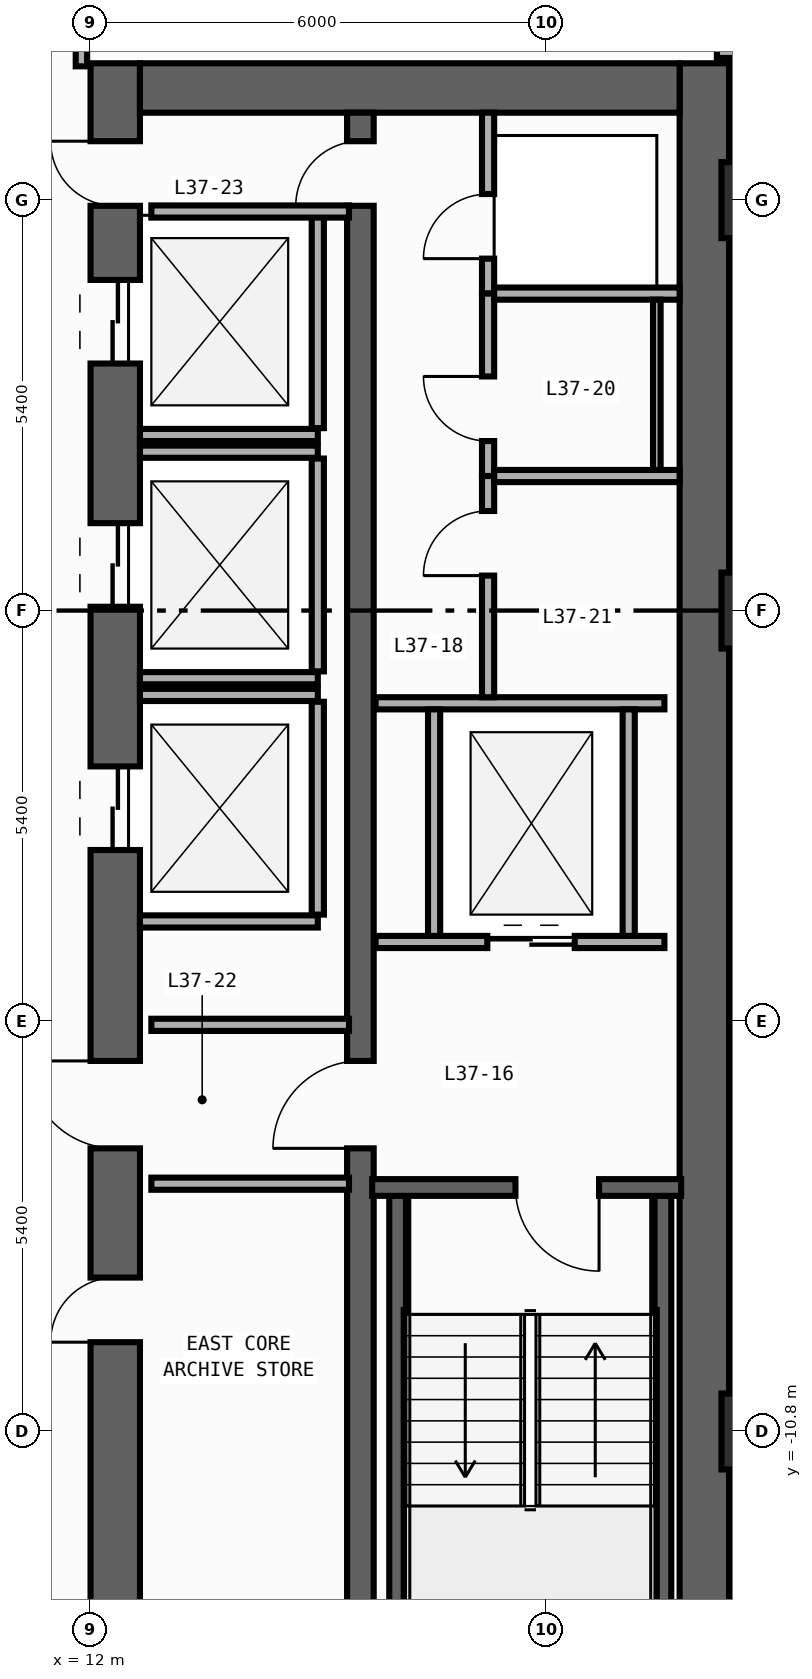
"""IFC4 building model, lengths in metres.
Left out: names, types, materials, properties, quantities, classifications, styles, units other than length and angle.
Written with IfcOpenShell. Run it as: python <this file> out.ifc"""

import sys

from ifc_helpers import new_model, si_unit, direction, frame, frame_2d, origin, origin_2d, place, context, subcontext, project, spatial, rectangle, extrude, element, fill, save


model = new_model("IFC4")
c1 = context("Model", 3, precision=1e-05, world=origin(), true_north=direction((0.0, 1.0)))
c2 = subcontext(c1, "Body", "Model", "MODEL_VIEW")
j1 = project(units=[si_unit("LENGTHUNIT", "METRE"), si_unit("PLANEANGLEUNIT", "RADIAN")], contexts=[c1])
p1 = place(None, origin())
s1 = spatial("IfcSite", under=j1, at=p1, CompositionType="ELEMENT")
p2 = place(p1, origin())
s2 = spatial("IfcBuilding", under=s1, at=p2, CompositionType="ELEMENT")
p3 = place(p2, frame((0.0, 0.0, 165.0)))
s3 = spatial("IfcBuildingStorey", under=s2, at=p3, CompositionType="ELEMENT", Elevation=165.0)
p4 = place(p3, frame((12.325, -19.8, 0.0), z_axis=(0.0, 0.0, 1.0), x_axis=(0.0, 1.0, 0.0)))
e1 = element("IfcWall", 1, at=p4, inside=s3, PredefinedType="SHEAR", context=c2, shape_type="SweptSolid", body=[
    extrude(rectangle(XDim=27.0, YDim=0.65, at=frame_2d((13.5, 0.0))), origin(), (0.0, 0.0, 1.0), 3.54),
])
p5 = place(p4, frame((23.05, 0.0, 0.0)))
e2 = element("IfcOpeningElement", 2, at=p5, cuts=e1, PredefinedType="OPENING", context=c2, shape_type="SweptSolid", body=[
    extrude(rectangle(XDim=1.1, YDim=2.2, at=frame_2d((0.55, 1.1))), frame((0.0, 0.335, 0.0), z_axis=(0.0, -1.0, 0.0), x_axis=(1.0, 0.0, 0.0)), (0.0, 0.0, 1.0), 0.67),
])
p6 = place(p4, frame((19.85, 0.0, 0.0)))
e3 = element("IfcOpeningElement", 3, at=p6, cuts=e1, PredefinedType="OPENING", context=c2, shape_type="SweptSolid", body=[
    extrude(rectangle(XDim=1.1, YDim=2.2, at=frame_2d((0.55, 1.1))), frame((0.0, 0.335, 0.0), z_axis=(0.0, -1.0, 0.0), x_axis=(1.0, 0.0, 0.0)), (0.0, 0.0, 1.0), 0.67),
])
p7 = place(p4, frame((16.65, 0.0, 0.0)))
e4 = element("IfcOpeningElement", 4, at=p7, cuts=e1, PredefinedType="OPENING", context=c2, shape_type="SweptSolid", body=[
    extrude(rectangle(XDim=1.1, YDim=2.2, at=frame_2d((0.55, 1.1))), frame((0.0, 0.335, 0.0), z_axis=(0.0, -1.0, 0.0), x_axis=(1.0, 0.0, 0.0)), (0.0, 0.0, 1.0), 0.67),
])
p8 = place(p4, frame((10.175, 0.0, 0.0)))
e5 = element("IfcOpeningElement", 5, at=p8, cuts=e1, PredefinedType="OPENING", context=c2, shape_type="SweptSolid", body=[
    extrude(rectangle(XDim=0.85, YDim=2.1, at=frame_2d((0.425, 1.05))), frame((0.0, 0.335, 0.0), z_axis=(0.0, -1.0, 0.0), x_axis=(1.0, 0.0, 0.0)), (0.0, 0.0, 1.0), 0.67),
])
p9 = place(p4, frame((12.725, 0.0, 0.0)))
e6 = element("IfcOpeningElement", 6, at=p9, cuts=e1, PredefinedType="OPENING", context=c2, shape_type="SweptSolid", body=[
    extrude(rectangle(XDim=1.15, YDim=2.2, at=frame_2d((0.575, 1.1))), frame((0.0, 0.335, 0.0), z_axis=(0.0, -1.0, 0.0), x_axis=(1.0, 0.0, 0.0)), (0.0, 0.0, 1.0), 0.67),
])
p10 = place(p4, frame((25.125, 0.0, 0.0)))
e7 = element("IfcOpeningElement", 7, at=p10, cuts=e1, PredefinedType="OPENING", context=c2, shape_type="SweptSolid", body=[
    extrude(rectangle(XDim=0.85, YDim=2.1, at=frame_2d((0.425, 1.05))), frame((0.0, 0.335, 0.0), z_axis=(0.0, -1.0, 0.0), x_axis=(1.0, 0.0, 0.0)), (0.0, 0.0, 1.0), 0.67),
])
p11 = place(p3, frame((20.075, -19.8, 0.0), z_axis=(0.0, 0.0, 1.0), x_axis=(0.0, 1.0, 0.0)))
e8 = element("IfcWall", 8, at=p11, inside=s3, PredefinedType="SHEAR", context=c2, shape_type="SweptSolid", body=[
    extrude(rectangle(XDim=27.0, YDim=0.65, at=frame_2d((13.5, 0.0))), origin(), (0.0, 0.0, 1.0), 3.54),
])
p12 = place(p3, frame((12.65, 6.875, 0.0), z_axis=(0.0, 0.0, 1.0), x_axis=(1.0, 0.0, 0.0)))
e9 = element("IfcWall", 9, at=p12, inside=s3, PredefinedType="SHEAR", context=c2, shape_type="SweptSolid", body=[
    extrude(rectangle(XDim=7.1, YDim=0.65, at=frame_2d((3.55, 0.0))), origin(), (0.0, 0.0, 1.0), 3.54),
])
p13 = place(p3, frame((15.55, -19.15, 0.0), z_axis=(0.0, 0.0, 1.0), x_axis=(0.0, 1.0, 0.0)))
e10 = element("IfcWall", 10, at=p13, inside=s3, PredefinedType="SHEAR", context=c2, shape_type="SweptSolid", body=[
    extrude(rectangle(XDim=25.7, YDim=0.35, at=frame_2d((12.85, 0.0))), origin(), (0.0, 0.0, 1.0), 3.54),
])
p14 = place(p13, frame((12.075, 0.0, 0.0)))
e11 = element("IfcOpeningElement", 11, at=p14, cuts=e10, PredefinedType="OPENING", context=c2, shape_type="SweptSolid", body=[
    extrude(rectangle(XDim=1.15, YDim=2.2, at=frame_2d((0.575, 1.1))), frame((0.0, 0.185, 0.0), z_axis=(0.0, -1.0, 0.0), x_axis=(1.0, 0.0, 0.0)), (0.0, 0.0, 1.0), 0.37),
])
p15 = place(p13, frame((24.475, 0.0, 0.0)))
e12 = element("IfcOpeningElement", 12, at=p15, cuts=e10, PredefinedType="OPENING", context=c2, shape_type="SweptSolid", body=[
    extrude(rectangle(XDim=0.85, YDim=2.1, at=frame_2d((0.425, 1.05))), frame((0.0, 0.185, 0.0), z_axis=(0.0, -1.0, 0.0), x_axis=(1.0, 0.0, 0.0)), (0.0, 0.0, 1.0), 0.37),
])
for number, where, z_axis, x_axis in (
    (13, (16.04, -19.01, 0.0), (0.0, 0.0, 1.0), (0.0, 1.0, 0.0)),
    (14, (19.53, -19.01, 0.0), (0.0, 0.0, 1.0), (0.0, 1.0, 0.0)),
):
    element("IfcWall", number, at=place(p3, frame(where, z_axis=z_axis, x_axis=x_axis)), inside=s3, PredefinedType="SHEAR", context=c2, shape_type="SweptSolid", body=[
        extrude(rectangle(XDim=11.42, YDim=0.22, at=frame_2d((5.71, 0.0))), origin(), (0.0, 0.0, 1.0), 3.54),
    ])
p16 = place(p3, frame((19.77, -7.59, 0.0), z_axis=(0.0, 0.0, 1.0), x_axis=(-1.0, 0.0, 0.0)))
e15 = element("IfcWall", 15, at=p16, inside=s3, PredefinedType="SHEAR", context=c2, shape_type="SweptSolid", body=[
    extrude(rectangle(XDim=4.065, YDim=0.22, at=frame_2d((2.032, 0.0))), origin(), (0.0, 0.0, 1.0), 3.54),
])
p17 = place(p16, frame((1.08, 0.0, 0.0)))
e16 = element("IfcOpeningElement", 16, at=p17, cuts=e15, PredefinedType="OPENING", context=c2, shape_type="SweptSolid", body=[
    extrude(rectangle(XDim=1.1, YDim=2.2, at=frame_2d((0.55, 1.1))), frame((0.0, 0.12, 0.0), z_axis=(0.0, -1.0, 0.0), x_axis=(1.0, 0.0, 0.0)), (0.0, 0.0, 1.0), 0.24),
])
for number, where, z_axis, x_axis in (
    (17, (20.8, -10.8, 0.0), (0.0, 0.0, 1.0), (1.0, 0.0, 0.0)),
    (18, (20.8, 0.0, 0.0), (0.0, 0.0, 1.0), (1.0, 0.0, 0.0)),
    (19, (20.8, 5.4, 0.0), (0.0, 0.0, 1.0), (1.0, 0.0, 0.0)),
):
    element("IfcColumn", number, at=place(p3, frame(where, z_axis=z_axis, x_axis=x_axis)), inside=s3, PredefinedType="COLUMN", context=c2, shape_type="SweptSolid", body=[
        extrude(rectangle(XDim=1.0, YDim=1.0, at=origin_2d()), origin(), (0.0, 0.0, 1.0), 3.8),
    ])
p18 = place(p3, frame((12.65, 2.31, 0.0), z_axis=(0.0, 0.0, 1.0), x_axis=(1.0, 0.0, 0.0)))
e20 = element("IfcWall", 20, at=p18, inside=s3, PredefinedType="STANDARD", context=c2, shape_type="SweptSolid", body=[
    extrude(rectangle(XDim=2.34, YDim=0.16, at=frame_2d((1.17, 0.0))), origin(), (0.0, 0.0, 1.0), 3.54),
])
p19 = place(p3, frame((14.99, 2.4, 0.0), z_axis=(0.0, 0.0, 1.0), x_axis=(0.0, 1.0, 0.0)))
e21 = element("IfcWall", 21, at=p19, inside=s3, PredefinedType="STANDARD", context=c2, shape_type="SweptSolid", body=[
    extrude(rectangle(XDim=2.8, YDim=0.16, at=frame_2d((1.4, 0.0))), origin(), (0.0, 0.0, 1.0), 3.54),
])
for number, where, z_axis, x_axis in (
    (22, (12.65, -0.89, 0.0), (0.0, 0.0, 1.0), (1.0, 0.0, 0.0)),
    (23, (12.65, 2.09, 0.0), (0.0, 0.0, 1.0), (1.0, 0.0, 0.0)),
):
    element("IfcWall", number, at=place(p3, frame(where, z_axis=z_axis, x_axis=x_axis)), inside=s3, PredefinedType="STANDARD", context=c2, shape_type="SweptSolid", body=[
        extrude(rectangle(XDim=2.34, YDim=0.16, at=frame_2d((1.17, 0.0))), origin(), (0.0, 0.0, 1.0), 3.54),
    ])
p20 = place(p3, frame((14.99, -0.8, 0.0), z_axis=(0.0, 0.0, 1.0), x_axis=(0.0, 1.0, 0.0)))
e24 = element("IfcWall", 24, at=p20, inside=s3, PredefinedType="STANDARD", context=c2, shape_type="SweptSolid", body=[
    extrude(rectangle(XDim=2.8, YDim=0.16, at=frame_2d((1.4, 0.0))), origin(), (0.0, 0.0, 1.0), 3.54),
])
for number, where, z_axis, x_axis in (
    (25, (12.65, -4.09, 0.0), (0.0, 0.0, 1.0), (1.0, 0.0, 0.0)),
    (26, (12.65, -1.11, 0.0), (0.0, 0.0, 1.0), (1.0, 0.0, 0.0)),
):
    element("IfcWall", number, at=place(p3, frame(where, z_axis=z_axis, x_axis=x_axis)), inside=s3, PredefinedType="STANDARD", context=c2, shape_type="SweptSolid", body=[
        extrude(rectangle(XDim=2.34, YDim=0.16, at=frame_2d((1.17, 0.0))), origin(), (0.0, 0.0, 1.0), 3.54),
    ])
p21 = place(p3, frame((14.99, -4.0, 0.0), z_axis=(0.0, 0.0, 1.0), x_axis=(0.0, 1.0, 0.0)))
e27 = element("IfcWall", 27, at=p21, inside=s3, PredefinedType="STANDARD", context=c2, shape_type="SweptSolid", body=[
    extrude(rectangle(XDim=2.8, YDim=0.16, at=frame_2d((1.4, 0.0))), origin(), (0.0, 0.0, 1.0), 3.54),
])
p22 = place(p3, frame((15.75, -4.36, 0.0), z_axis=(0.0, 0.0, 1.0), x_axis=(1.0, 0.0, 0.0)))
e28 = element("IfcWall", 28, at=p22, inside=s3, PredefinedType="STANDARD", context=c2, shape_type="SweptSolid", body=[
    extrude(rectangle(XDim=3.8, YDim=0.16, at=frame_2d((1.9, 0.0))), origin(), (0.0, 0.0, 1.0), 3.54),
])
p23 = place(p22, frame((1.47, 0.0, 0.0)))
e29 = element("IfcOpeningElement", 29, at=p23, cuts=e28, PredefinedType="OPENING", context=c2, shape_type="SweptSolid", body=[
    extrude(rectangle(XDim=1.15, YDim=2.2, at=frame_2d((0.575, 1.1))), frame((0.0, 0.09, 0.0), z_axis=(0.0, -1.0, 0.0), x_axis=(1.0, 0.0, 0.0)), (0.0, 0.0, 1.0), 0.18),
])
p24 = place(p3, frame((15.75, -1.22, 0.0), z_axis=(0.0, 0.0, 1.0), x_axis=(1.0, 0.0, 0.0)))
e30 = element("IfcWall", 30, at=p24, inside=s3, PredefinedType="STANDARD", context=c2, shape_type="SweptSolid", body=[
    extrude(rectangle(XDim=3.8, YDim=0.16, at=frame_2d((1.9, 0.0))), origin(), (0.0, 0.0, 1.0), 3.54),
])
for number, where, z_axis, x_axis in (
    (31, (16.52, -4.28, 0.0), (0.0, 0.0, 1.0), (0.0, 1.0, 0.0)),
    (32, (19.08, -4.28, 0.0), (0.0, 0.0, 1.0), (0.0, 1.0, 0.0)),
):
    element("IfcWall", number, at=place(p3, frame(where, z_axis=z_axis, x_axis=x_axis)), inside=s3, PredefinedType="STANDARD", context=c2, shape_type="SweptSolid", body=[
        extrude(rectangle(XDim=2.98, YDim=0.16, at=frame_2d((1.49, 0.0))), origin(), (0.0, 0.0, 1.0), 3.54),
    ])
for number, where, z_axis, x_axis in (
    (33, (12.8, -5.45, 0.0), (0.0, 0.0, 1.0), (1.0, 0.0, 0.0)),
    (34, (12.8, -7.54, 0.0), (0.0, 0.0, 1.0), (1.0, 0.0, 0.0)),
    (35, (12.8, 5.25, 0.0), (0.0, 0.0, 1.0), (1.0, 0.0, 0.0)),
):
    element("IfcWall", number, at=place(p3, frame(where, z_axis=z_axis, x_axis=x_axis)), inside=s3, PredefinedType="STANDARD", context=c2, shape_type="SweptSolid", body=[
        extrude(rectangle(XDim=2.6, YDim=0.16, at=frame_2d((1.3, 0.0))), origin(), (0.0, 0.0, 1.0), 3.54),
    ])
p25 = place(p3, frame((17.23, 4.17, 0.0), z_axis=(0.0, 0.0, 1.0), x_axis=(0.0, 1.0, 0.0)))
e36 = element("IfcWall", 36, at=p25, inside=s3, PredefinedType="PARTITIONING", context=c2, shape_type="SweptSolid", body=[
    extrude(rectangle(XDim=2.38, YDim=0.16, at=frame_2d((1.19, 0.0))), origin(), (0.0, 0.0, 1.0), 3.54),
])
p26 = place(p25, frame((0.46, 0.0, 0.0)))
e37 = element("IfcOpeningElement", 37, at=p26, cuts=e36, PredefinedType="OPENING", context=c2, shape_type="SweptSolid", body=[
    extrude(rectangle(XDim=0.85, YDim=2.1, at=frame_2d((0.425, 1.05))), frame((0.0, 0.09, 0.0), z_axis=(0.0, -1.0, 0.0), x_axis=(1.0, 0.0, 0.0)), (0.0, 0.0, 1.0), 0.18),
])
p27 = place(p3, frame((17.23, 1.77, 0.0), z_axis=(0.0, 0.0, 1.0), x_axis=(0.0, 1.0, 0.0)))
e38 = element("IfcWall", 38, at=p27, inside=s3, PredefinedType="PARTITIONING", context=c2, shape_type="SweptSolid", body=[
    extrude(rectangle(XDim=2.4, YDim=0.16, at=frame_2d((1.2, 0.0))), origin(), (0.0, 0.0, 1.0), 3.54),
])
p28 = place(p27, frame((0.46, 0.0, 0.0)))
e39 = element("IfcOpeningElement", 39, at=p28, cuts=e38, PredefinedType="OPENING", context=c2, shape_type="SweptSolid", body=[
    extrude(rectangle(XDim=0.85, YDim=2.1, at=frame_2d((0.425, 1.05))), frame((0.0, 0.09, 0.0), z_axis=(0.0, -1.0, 0.0), x_axis=(1.0, 0.0, 0.0)), (0.0, 0.0, 1.0), 0.18),
])
p29 = place(p3, frame((17.23, -1.14, 0.0), z_axis=(0.0, 0.0, 1.0), x_axis=(0.0, 1.0, 0.0)))
e40 = element("IfcWall", 40, at=p29, inside=s3, PredefinedType="PARTITIONING", context=c2, shape_type="SweptSolid", body=[
    extrude(rectangle(XDim=2.91, YDim=0.16, at=frame_2d((1.455, 0.0))), origin(), (0.0, 0.0, 1.0), 3.54),
])
p30 = place(p29, frame((1.6, 0.0, 0.0)))
e41 = element("IfcOpeningElement", 41, at=p30, cuts=e40, PredefinedType="OPENING", context=c2, shape_type="SweptSolid", body=[
    extrude(rectangle(XDim=0.85, YDim=2.1, at=frame_2d((0.425, 1.05))), frame((0.0, 0.09, 0.0), z_axis=(0.0, -1.0, 0.0), x_axis=(1.0, 0.0, 0.0)), (0.0, 0.0, 1.0), 0.18),
])
for number, where, z_axis, x_axis in (
    (42, (17.31, 4.17, 0.0), (0.0, 0.0, 1.0), (1.0, 0.0, 0.0)),
    (43, (17.31, 1.77, 0.0), (0.0, 0.0, 1.0), (1.0, 0.0, 0.0)),
):
    element("IfcWall", number, at=place(p3, frame(where, z_axis=z_axis, x_axis=x_axis)), inside=s3, PredefinedType="PARTITIONING", context=c2, shape_type="SweptSolid", body=[
        extrude(rectangle(XDim=2.44, YDim=0.16, at=frame_2d((1.22, 0.0))), origin(), (0.0, 0.0, 1.0), 3.54),
    ])
p31 = place(p3, frame((11.88, 7.16, 0.0), z_axis=(0.0, 0.0, 1.0), x_axis=(0.0, 1.0, 0.0)))
e44 = element("IfcWall", 44, at=p31, inside=s3, PredefinedType="PARTITIONING", context=c2, shape_type="SweptSolid", body=[
    extrude(rectangle(XDim=8.455, YDim=0.15, at=frame_2d((4.228, 0.0))), origin(), (0.0, 0.0, 1.0), 3.54),
])
p32 = place(p31, frame((0.46, 0.0, 0.0)))
e45 = element("IfcOpeningElement", 45, at=p32, cuts=e44, PredefinedType="OPENING", context=c2, shape_type="SweptSolid", body=[
    extrude(rectangle(XDim=0.9, YDim=2.15, at=frame_2d((0.45, 1.075))), frame((0.0, 0.085, 0.0), z_axis=(0.0, -1.0, 0.0), x_axis=(1.0, 0.0, 0.0)), (0.0, 0.0, 1.0), 0.17),
])
p33 = place(p3, frame((20.24, 7.34, 0.0), z_axis=(0.0, 0.0, 1.0), x_axis=(1.0, 0.0, 0.0)))
e46 = element("IfcWall", 46, at=p33, inside=s3, PredefinedType="PARTITIONING", context=c2, shape_type="SweptSolid", body=[
    extrude(rectangle(XDim=2.215, YDim=0.14, at=frame_2d((1.107, 0.0))), origin(), (0.0, 0.0, 1.0), 3.54),
])
p34 = place(p33, frame((0.905, 0.0, 0.0)))
e47 = element("IfcOpeningElement", 47, at=p34, cuts=e46, PredefinedType="OPENING", context=c2, shape_type="SweptSolid", body=[
    extrude(rectangle(XDim=0.85, YDim=2.1, at=frame_2d((0.425, 1.05))), frame((0.0, 0.08, 0.0), z_axis=(0.0, -1.0, 0.0), x_axis=(1.0, 0.0, 0.0)), (0.0, 0.0, 1.0), 0.16),
])
p35 = place(p3, frame((19.45, 4.09, 0.0), z_axis=(0.0, 0.0, 1.0), x_axis=(0.0, -1.0, 0.0)))
e48 = element("IfcWall", 48, at=p35, inside=s3, PredefinedType="PARTITIONING", context=c2, shape_type="SweptSolid", body=[
    extrude(rectangle(XDim=2.24, YDim=0.1, at=frame_2d((1.12, 0.0))), origin(), (0.0, 0.0, 1.0), 3.54),
])
p36 = place(p17, origin())
e49 = element("IfcDoor", 49, at=p36, inside=s3, OperationType="SINGLE_SWING_LEFT", PredefinedType="DOOR", context=c2, shape_type="SweptSolid", body=[
    extrude(rectangle(XDim=1.1, YDim=2.2, at=frame_2d((0.55, 1.1))), frame((0.0, 0.025, 0.0), z_axis=(0.0, -1.0, 0.0), x_axis=(1.0, 0.0, 0.0)), (0.0, 0.0, 1.0), 0.05),
])
fill(e16, e49)
p37 = place(p5, origin())
e50 = element("IfcDoor", 50, at=p37, inside=s3, OperationType="DOUBLE_DOOR_SLIDING", PredefinedType="DOOR", context=c2, shape_type="SweptSolid", body=[
    extrude(rectangle(XDim=1.1, YDim=2.2, at=frame_2d((0.55, 1.1))), frame((0.0, 0.025, 0.0), z_axis=(0.0, -1.0, 0.0), x_axis=(1.0, 0.0, 0.0)), (0.0, 0.0, 1.0), 0.05),
])
fill(e2, e50)
p38 = place(p6, origin())
e51 = element("IfcDoor", 51, at=p38, inside=s3, OperationType="DOUBLE_DOOR_SLIDING", PredefinedType="DOOR", context=c2, shape_type="SweptSolid", body=[
    extrude(rectangle(XDim=1.1, YDim=2.2, at=frame_2d((0.55, 1.1))), frame((0.0, 0.025, 0.0), z_axis=(0.0, -1.0, 0.0), x_axis=(1.0, 0.0, 0.0)), (0.0, 0.0, 1.0), 0.05),
])
fill(e3, e51)
p39 = place(p7, origin())
e52 = element("IfcDoor", 52, at=p39, inside=s3, OperationType="DOUBLE_DOOR_SLIDING", PredefinedType="DOOR", context=c2, shape_type="SweptSolid", body=[
    extrude(rectangle(XDim=1.1, YDim=2.2, at=frame_2d((0.55, 1.1))), frame((0.0, 0.025, 0.0), z_axis=(0.0, -1.0, 0.0), x_axis=(1.0, 0.0, 0.0)), (0.0, 0.0, 1.0), 0.05),
])
fill(e4, e52)
p40 = place(p8, origin())
e53 = element("IfcDoor", 53, at=p40, inside=s3, OperationType="SINGLE_SWING_LEFT", PredefinedType="DOOR", context=c2, shape_type="SweptSolid", body=[
    extrude(rectangle(XDim=0.85, YDim=2.1, at=frame_2d((0.425, 1.05))), frame((0.0, 0.025, 0.0), z_axis=(0.0, -1.0, 0.0), x_axis=(1.0, 0.0, 0.0)), (0.0, 0.0, 1.0), 0.05),
])
fill(e5, e53)
p41 = place(p9, origin())
e54 = element("IfcDoor", 54, at=p41, inside=s3, OperationType="SINGLE_SWING_RIGHT", PredefinedType="DOOR", context=c2, shape_type="SweptSolid", body=[
    extrude(rectangle(XDim=1.15, YDim=2.2, at=frame_2d((0.575, 1.1))), frame((0.0, 0.025, 0.0), z_axis=(0.0, -1.0, 0.0), x_axis=(1.0, 0.0, 0.0)), (0.0, 0.0, 1.0), 0.05),
])
fill(e6, e54)
p42 = place(p14, origin())
e55 = element("IfcDoor", 55, at=p42, inside=s3, OperationType="SINGLE_SWING_LEFT", PredefinedType="DOOR", context=c2, shape_type="SweptSolid", body=[
    extrude(rectangle(XDim=1.15, YDim=2.2, at=frame_2d((0.575, 1.1))), frame((0.0, 0.025, 0.0), z_axis=(0.0, -1.0, 0.0), x_axis=(1.0, 0.0, 0.0)), (0.0, 0.0, 1.0), 0.05),
])
fill(e11, e55)
p43 = place(p10, origin())
e56 = element("IfcDoor", 56, at=p43, inside=s3, OperationType="SINGLE_SWING_RIGHT", PredefinedType="DOOR", context=c2, shape_type="SweptSolid", body=[
    extrude(rectangle(XDim=0.85, YDim=2.1, at=frame_2d((0.425, 1.05))), frame((0.0, 0.025, 0.0), z_axis=(0.0, -1.0, 0.0), x_axis=(1.0, 0.0, 0.0)), (0.0, 0.0, 1.0), 0.05),
])
fill(e7, e56)
p44 = place(p15, origin())
e57 = element("IfcDoor", 57, at=p44, inside=s3, OperationType="SINGLE_SWING_LEFT", PredefinedType="DOOR", context=c2, shape_type="SweptSolid", body=[
    extrude(rectangle(XDim=0.85, YDim=2.1, at=frame_2d((0.425, 1.05))), frame((0.0, 0.025, 0.0), z_axis=(0.0, -1.0, 0.0), x_axis=(1.0, 0.0, 0.0)), (0.0, 0.0, 1.0), 0.05),
])
fill(e12, e57)
p45 = place(p23, origin())
e58 = element("IfcDoor", 58, at=p45, inside=s3, OperationType="DOUBLE_DOOR_SLIDING", PredefinedType="DOOR", context=c2, shape_type="SweptSolid", body=[
    extrude(rectangle(XDim=1.15, YDim=2.2, at=frame_2d((0.575, 1.1))), frame((0.0, 0.025, 0.0), z_axis=(0.0, -1.0, 0.0), x_axis=(1.0, 0.0, 0.0)), (0.0, 0.0, 1.0), 0.05),
])
fill(e29, e58)
p46 = place(p26, origin())
e59 = element("IfcDoor", 59, at=p46, inside=s3, OperationType="SINGLE_SWING_LEFT", PredefinedType="DOOR", context=c2, shape_type="SweptSolid", body=[
    extrude(rectangle(XDim=0.85, YDim=2.1, at=frame_2d((0.425, 1.05))), frame((0.0, 0.025, 0.0), z_axis=(0.0, -1.0, 0.0), x_axis=(1.0, 0.0, 0.0)), (0.0, 0.0, 1.0), 0.05),
])
fill(e37, e59)
p47 = place(p28, origin())
e60 = element("IfcDoor", 60, at=p47, inside=s3, OperationType="SINGLE_SWING_RIGHT", PredefinedType="DOOR", context=c2, shape_type="SweptSolid", body=[
    extrude(rectangle(XDim=0.85, YDim=2.1, at=frame_2d((0.425, 1.05))), frame((0.0, 0.025, 0.0), z_axis=(0.0, -1.0, 0.0), x_axis=(1.0, 0.0, 0.0)), (0.0, 0.0, 1.0), 0.05),
])
fill(e39, e60)
p48 = place(p30, origin())
e61 = element("IfcDoor", 61, at=p48, inside=s3, OperationType="SINGLE_SWING_LEFT", PredefinedType="DOOR", context=c2, shape_type="SweptSolid", body=[
    extrude(rectangle(XDim=0.85, YDim=2.1, at=frame_2d((0.425, 1.05))), frame((0.0, 0.025, 0.0), z_axis=(0.0, -1.0, 0.0), x_axis=(1.0, 0.0, 0.0)), (0.0, 0.0, 1.0), 0.05),
])
fill(e41, e61)
save(model, sys.argv[1])
